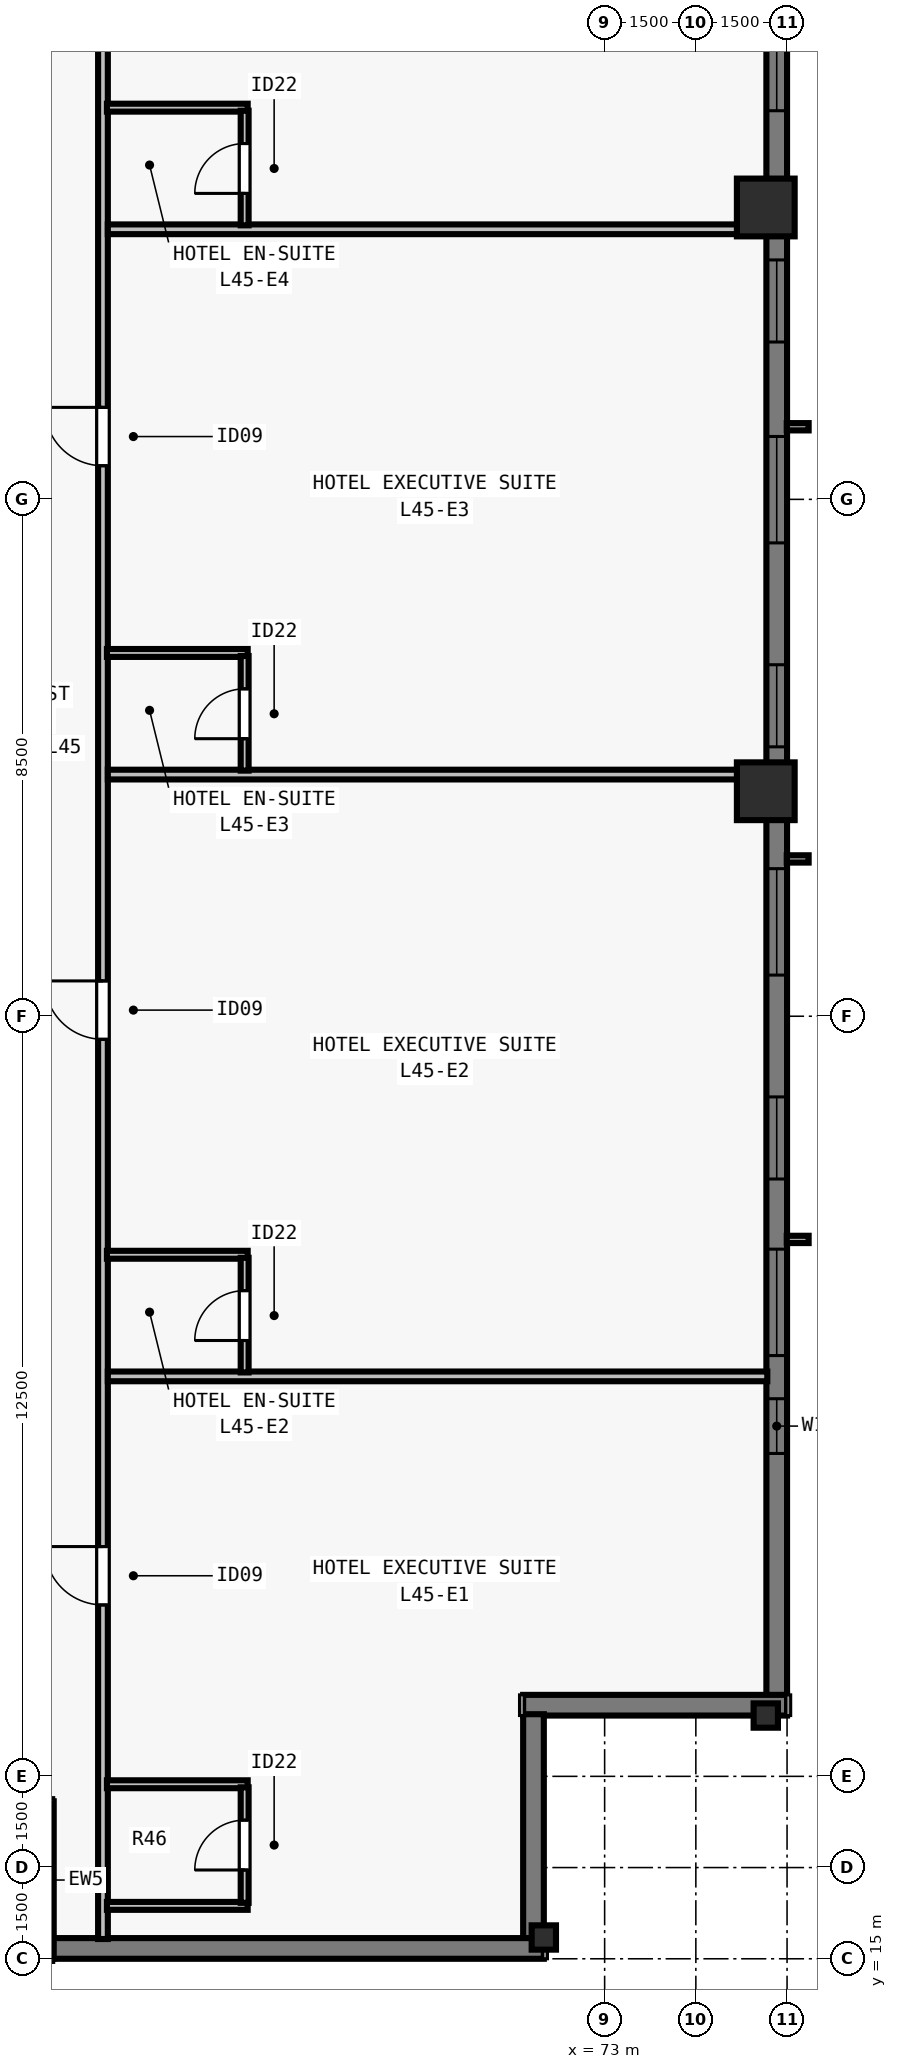
"""IFC4 building model, lengths in metres.
Left out: names, types, materials, properties, quantities, classifications, styles, units other than length and angle.
Written with IfcOpenShell. Run it as: python <this file> out.ifc"""

import sys

from ifc_helpers import new_model, si_unit, direction, frame, frame_2d, origin, origin_2d, place, context, subcontext, project, spatial, rectangle, i_section, extrude, element, fill, save


model = new_model("IFC4")
c1 = context("Model", 3, precision=1e-05, world=origin(), true_north=direction((0.0, 1.0)))
c2 = subcontext(c1, "Body", "Model", "MODEL_VIEW")
j1 = project(units=[si_unit("LENGTHUNIT", "METRE"), si_unit("PLANEANGLEUNIT", "RADIAN")], contexts=[c1])
p1 = place(None, origin())
s1 = spatial("IfcSite", under=j1, at=p1, CompositionType="ELEMENT")
p2 = place(p1, origin())
s2 = spatial("IfcBuilding", under=s1, at=p2, CompositionType="ELEMENT")
p3 = place(p2, frame((0.0, 0.0, 165.5)))
s3 = spatial("IfcBuildingStorey", under=s2, at=p3, CompositionType="ELEMENT", Elevation=165.5)
for number, where, z_axis, x_axis in (
    (1, (72.0, 15.35, 0.0), (0.0, 0.0, 1.0), (1.0, 0.0, 0.0)),
    (2, (75.65, 19.0, 0.0), (0.0, 0.0, 1.0), (0.0, 1.0, 0.0)),
):
    element("IfcColumn", number, at=place(p3, frame(where, z_axis=z_axis, x_axis=x_axis)), inside=s3, PredefinedType="COLUMN", context=c2, shape_type="SweptSolid", body=[
        extrude(i_section(OverallWidth=0.4, OverallDepth=0.4, WebThickness=0.022, FlangeThickness=0.036, at=origin_2d()), origin(), (0.0, 0.0, 1.0), 3.5),
    ])
for number, where, z_axis, x_axis in (
    (3, (75.65, 34.2, 0.0), (0.0, 0.0, 1.0), (0.0, 1.0, 0.0)),
    (4, (75.65, 43.8, 0.0), (0.0, 0.0, 1.0), (0.0, 1.0, 0.0)),
):
    element("IfcColumn", number, at=place(p3, frame(where, z_axis=z_axis, x_axis=x_axis)), inside=s3, PredefinedType="COLUMN", context=c2, shape_type="SweptSolid", body=[
        extrude(rectangle(XDim=0.95, YDim=0.95, at=origin_2d()), origin(), (0.0, 0.0, 1.0), 3.5),
    ])
p4 = place(p3, frame((75.83, 59.0, 0.0), z_axis=(0.0, 0.0, 1.0), x_axis=(0.0, -1.0, 0.0)))
e5 = element("IfcWall", 5, at=p4, inside=s3, PredefinedType="SOLIDWALL", context=c2, shape_type="SweptSolid", body=[
    extrude(rectangle(XDim=39.682, YDim=0.34, at=frame_2d((19.841, 0.0))), origin(), (0.0, 0.0, 1.0), 3.28),
])
p5 = place(p4, frame((6.002, 0.0, 0.8)))
e6 = element("IfcOpeningElement", 6, at=p5, cuts=e5, PredefinedType="OPENING", context=c2, shape_type="SweptSolid", body=[
    extrude(rectangle(XDim=1.75, YDim=1.66, at=frame_2d((0.875, 0.83))), frame((0.0, 0.18, 0.0), z_axis=(0.0, -1.0, 0.0), x_axis=(1.0, 0.0, 0.0)), (0.0, 0.0, 1.0), 0.36),
])
p6 = place(p4, frame((8.505, 0.0, 0.8)))
e7 = element("IfcOpeningElement", 7, at=p6, cuts=e5, PredefinedType="OPENING", context=c2, shape_type="SweptSolid", body=[
    extrude(rectangle(XDim=1.35, YDim=1.66, at=frame_2d((0.675, 0.83))), frame((0.0, 0.18, 0.0), z_axis=(0.0, -1.0, 0.0), x_axis=(1.0, 0.0, 0.0)), (0.0, 0.0, 1.0), 0.36),
])
p7 = place(p4, frame((11.859, 0.0, 0.8)))
e8 = element("IfcOpeningElement", 8, at=p7, cuts=e5, PredefinedType="OPENING", context=c2, shape_type="SweptSolid", body=[
    extrude(rectangle(XDim=1.75, YDim=1.66, at=frame_2d((0.875, 0.83))), frame((0.0, 0.18, 0.0), z_axis=(0.0, -1.0, 0.0), x_axis=(1.0, 0.0, 0.0)), (0.0, 0.0, 1.0), 0.36),
])
p8 = place(p4, frame((16.062, 0.0, 0.8)))
e9 = element("IfcOpeningElement", 9, at=p8, cuts=e5, PredefinedType="OPENING", context=c2, shape_type="SweptSolid", body=[
    extrude(rectangle(XDim=1.35, YDim=1.66, at=frame_2d((0.675, 0.83))), frame((0.0, 0.18, 0.0), z_axis=(0.0, -1.0, 0.0), x_axis=(1.0, 0.0, 0.0)), (0.0, 0.0, 1.0), 0.36),
])
p9 = place(p4, frame((18.966, 0.0, 0.8)))
e10 = element("IfcOpeningElement", 10, at=p9, cuts=e5, PredefinedType="OPENING", context=c2, shape_type="SweptSolid", body=[
    extrude(rectangle(XDim=1.75, YDim=1.66, at=frame_2d((0.875, 0.83))), frame((0.0, 0.18, 0.0), z_axis=(0.0, -1.0, 0.0), x_axis=(1.0, 0.0, 0.0)), (0.0, 0.0, 1.0), 0.36),
])
p10 = place(p4, frame((22.719, 0.0, 0.8)))
e11 = element("IfcOpeningElement", 11, at=p10, cuts=e5, PredefinedType="OPENING", context=c2, shape_type="SweptSolid", body=[
    extrude(rectangle(XDim=1.35, YDim=1.66, at=frame_2d((0.675, 0.83))), frame((0.0, 0.18, 0.0), z_axis=(0.0, -1.0, 0.0), x_axis=(1.0, 0.0, 0.0)), (0.0, 0.0, 1.0), 0.36),
])
p11 = place(p4, frame((26.073, 0.0, 0.8)))
e12 = element("IfcOpeningElement", 12, at=p11, cuts=e5, PredefinedType="OPENING", context=c2, shape_type="SweptSolid", body=[
    extrude(rectangle(XDim=1.75, YDim=1.66, at=frame_2d((0.875, 0.83))), frame((0.0, 0.18, 0.0), z_axis=(0.0, -1.0, 0.0), x_axis=(1.0, 0.0, 0.0)), (0.0, 0.0, 1.0), 0.36),
])
p12 = place(p4, frame((29.827, 0.0, 0.8)))
e13 = element("IfcOpeningElement", 13, at=p12, cuts=e5, PredefinedType="OPENING", context=c2, shape_type="SweptSolid", body=[
    extrude(rectangle(XDim=1.35, YDim=1.66, at=frame_2d((0.675, 0.83))), frame((0.0, 0.18, 0.0), z_axis=(0.0, -1.0, 0.0), x_axis=(1.0, 0.0, 0.0)), (0.0, 0.0, 1.0), 0.36),
])
p13 = place(p4, frame((32.33, 0.0, 0.8)))
e14 = element("IfcOpeningElement", 14, at=p13, cuts=e5, PredefinedType="OPENING", context=c2, shape_type="SweptSolid", body=[
    extrude(rectangle(XDim=1.75, YDim=1.66, at=frame_2d((0.875, 0.83))), frame((0.0, 0.18, 0.0), z_axis=(0.0, -1.0, 0.0), x_axis=(1.0, 0.0, 0.0)), (0.0, 0.0, 1.0), 0.36),
])
p14 = place(p4, frame((34.79, 0.0, 0.8)))
e15 = element("IfcOpeningElement", 15, at=p14, cuts=e5, PredefinedType="OPENING", context=c2, shape_type="SweptSolid", body=[
    extrude(rectangle(XDim=0.9, YDim=1.66, at=frame_2d((0.45, 0.83))), frame((0.0, 0.18, 0.0), z_axis=(0.0, -1.0, 0.0), x_axis=(1.0, 0.0, 0.0)), (0.0, 0.0, 1.0), 0.36),
])
p15 = place(p3, frame((76.0, 19.17, 0.0), z_axis=(0.0, 0.0, 1.0), x_axis=(-1.0, 0.0, 0.0)))
e16 = element("IfcWall", 16, at=p15, inside=s3, PredefinedType="SOLIDWALL", context=c2, shape_type="SweptSolid", body=[
    extrude(rectangle(XDim=4.34, YDim=0.34, at=frame_2d((2.17, 0.0))), origin(), (0.0, 0.0, 1.0), 3.28),
])
p16 = place(p3, frame((71.83, 19.022, 0.0), z_axis=(0.0, 0.0, 1.0), x_axis=(0.0, -1.0, 0.0)))
e17 = element("IfcWall", 17, at=p16, inside=s3, PredefinedType="SOLIDWALL", context=c2, shape_type="SweptSolid", body=[
    extrude(rectangle(XDim=3.704, YDim=0.34, at=frame_2d((1.852, 0.0))), origin(), (0.0, 0.0, 1.0), 3.28),
])
p17 = place(p3, frame((72.0, 15.17, 0.0), z_axis=(0.0, 0.0, 1.0), x_axis=(-1.0, 0.0, 0.0)))
e18 = element("IfcWall", 18, at=p17, inside=s3, PredefinedType="SOLIDWALL", context=c2, shape_type="SweptSolid", body=[
    extrude(rectangle(XDim=8.082, YDim=0.34, at=frame_2d((4.041, 0.0))), origin(), (0.0, 0.0, 1.0), 3.28),
])
p18 = place(p3, frame((63.77, 15.0, 0.0), z_axis=(0.0, 0.0, 1.0), x_axis=(0.0, 1.0, 0.0)))
e19 = element("IfcWall", 19, at=p18, inside=s3, PredefinedType="SOLIDWALL", context=c2, shape_type="SweptSolid", body=[
    extrude(rectangle(XDim=2.59, YDim=0.34, at=frame_2d((1.295, 0.0))), origin(), (0.0, 0.0, 1.0), 3.28),
])
p19 = place(p3, frame((64.75, 15.325, 0.0), z_axis=(0.0, 0.0, 1.0), x_axis=(0.0, 1.0, 0.0)))
e20 = element("IfcWall", 20, at=p19, inside=s3, PredefinedType="PARTITIONING", context=c2, shape_type="SweptSolid", body=[
    extrude(rectangle(XDim=47.35, YDim=0.16, at=frame_2d((23.675, 0.0))), origin(), (0.0, 0.0, 1.0), 2.555),
])
p20 = place(p19, frame((5.494, 0.0, 0.0)))
e21 = element("IfcOpeningElement", 21, at=p20, cuts=e20, PredefinedType="OPENING", context=c2, shape_type="SweptSolid", body=[
    extrude(rectangle(XDim=0.96, YDim=2.15, at=frame_2d((0.48, 1.075))), frame((0.0, 0.09, 0.0), z_axis=(0.0, -1.0, 0.0), x_axis=(1.0, 0.0, 0.0)), (0.0, 0.0, 1.0), 0.18),
])
p21 = place(p19, frame((14.796, 0.0, 0.0)))
e22 = element("IfcOpeningElement", 22, at=p21, cuts=e20, PredefinedType="OPENING", context=c2, shape_type="SweptSolid", body=[
    extrude(rectangle(XDim=0.96, YDim=2.15, at=frame_2d((0.48, 1.075))), frame((0.0, 0.09, 0.0), z_axis=(0.0, -1.0, 0.0), x_axis=(1.0, 0.0, 0.0)), (0.0, 0.0, 1.0), 0.18),
])
p22 = place(p19, frame((24.228, 0.0, 0.0)))
e23 = element("IfcOpeningElement", 23, at=p22, cuts=e20, PredefinedType="OPENING", context=c2, shape_type="SweptSolid", body=[
    extrude(rectangle(XDim=0.96, YDim=2.15, at=frame_2d((0.48, 1.075))), frame((0.0, 0.09, 0.0), z_axis=(0.0, -1.0, 0.0), x_axis=(1.0, 0.0, 0.0)), (0.0, 0.0, 1.0), 0.18),
])
p23 = place(p19, frame((33.66, 0.0, 0.0)))
e24 = element("IfcOpeningElement", 24, at=p23, cuts=e20, PredefinedType="OPENING", context=c2, shape_type="SweptSolid", body=[
    extrude(rectangle(XDim=0.96, YDim=2.15, at=frame_2d((0.48, 1.075))), frame((0.0, 0.09, 0.0), z_axis=(0.0, -1.0, 0.0), x_axis=(1.0, 0.0, 0.0)), (0.0, 0.0, 1.0), 0.18),
])
p24 = place(p19, frame((43.229, 0.0, 0.0)))
e25 = element("IfcOpeningElement", 25, at=p24, cuts=e20, PredefinedType="OPENING", context=c2, shape_type="SweptSolid", body=[
    extrude(rectangle(XDim=0.96, YDim=2.15, at=frame_2d((0.48, 1.075))), frame((0.0, 0.09, 0.0), z_axis=(0.0, -1.0, 0.0), x_axis=(1.0, 0.0, 0.0)), (0.0, 0.0, 1.0), 0.18),
])
for number, where, z_axis, x_axis in (
    (26, (64.815, 15.87, 0.0), (0.0, 0.0, 1.0), (1.0, 0.0, 0.0)),
    (27, (64.815, 17.87, 0.0), (0.0, 0.0, 1.0), (1.0, 0.0, 0.0)),
):
    element("IfcWall", number, at=place(p3, frame(where, z_axis=z_axis, x_axis=x_axis)), inside=s3, PredefinedType="PLUMBINGWALL", context=c2, shape_type="SweptSolid", body=[
        extrude(rectangle(XDim=2.315, YDim=0.13, at=frame_2d((1.157, 0.0))), origin(), (0.0, 0.0, 1.0), 3.28),
    ])
p25 = place(p3, frame((67.08, 15.92, 0.0), z_axis=(0.0, 0.0, 1.0), x_axis=(0.0, 1.0, 0.0)))
e28 = element("IfcWall", 28, at=p25, inside=s3, PredefinedType="PLUMBINGWALL", context=c2, shape_type="SweptSolid", body=[
    extrude(rectangle(XDim=1.9, YDim=0.13, at=frame_2d((0.95, 0.0))), origin(), (0.0, 0.0, 1.0), 3.28),
])
p26 = place(p25, frame((0.54, 0.0, 0.0)))
e29 = element("IfcOpeningElement", 29, at=p26, cuts=e28, PredefinedType="OPENING", context=c2, shape_type="SweptSolid", body=[
    extrude(rectangle(XDim=0.82, YDim=2.1, at=frame_2d((0.41, 1.05))), frame((0.0, 0.075, 0.0), z_axis=(0.0, -1.0, 0.0), x_axis=(1.0, 0.0, 0.0)), (0.0, 0.0, 1.0), 0.15),
])
p27 = place(p3, frame((64.83, 24.577, 0.0), z_axis=(0.0, 0.0, 1.0), x_axis=(1.0, 0.0, 0.0)))
e30 = element("IfcWall", 30, at=p27, inside=s3, PredefinedType="PARTITIONING", context=c2, shape_type="SweptSolid", body=[
    extrude(rectangle(XDim=10.845, YDim=0.16, at=frame_2d((5.422, 0.0))), origin(), (0.0, 0.0, 1.0), 2.896),
])
p28 = place(p3, frame((64.815, 26.577, 0.0), z_axis=(0.0, 0.0, 1.0), x_axis=(1.0, 0.0, 0.0)))
e31 = element("IfcWall", 31, at=p28, inside=s3, PredefinedType="PLUMBINGWALL", context=c2, shape_type="SweptSolid", body=[
    extrude(rectangle(XDim=2.315, YDim=0.13, at=frame_2d((1.157, 0.0))), origin(), (0.0, 0.0, 1.0), 2.896),
])
p29 = place(p3, frame((67.08, 24.642, 0.0), z_axis=(0.0, 0.0, 1.0), x_axis=(0.0, 1.0, 0.0)))
e32 = element("IfcWall", 32, at=p29, inside=s3, PredefinedType="PLUMBINGWALL", context=c2, shape_type="SweptSolid", body=[
    extrude(rectangle(XDim=1.885, YDim=0.13, at=frame_2d((0.942, 0.0))), origin(), (0.0, 0.0, 1.0), 3.28),
])
p30 = place(p29, frame((0.525, 0.0, 0.0)))
e33 = element("IfcOpeningElement", 33, at=p30, cuts=e32, PredefinedType="OPENING", context=c2, shape_type="SweptSolid", body=[
    extrude(rectangle(XDim=0.82, YDim=2.1, at=frame_2d((0.41, 1.05))), frame((0.0, 0.075, 0.0), z_axis=(0.0, -1.0, 0.0), x_axis=(1.0, 0.0, 0.0)), (0.0, 0.0, 1.0), 0.15),
])
p31 = place(p3, frame((64.83, 34.474, 0.0), z_axis=(0.0, 0.0, 1.0), x_axis=(1.0, 0.0, 0.0)))
e34 = element("IfcWall", 34, at=p31, inside=s3, PredefinedType="PARTITIONING", context=c2, shape_type="SweptSolid", body=[
    extrude(rectangle(XDim=10.845, YDim=0.16, at=frame_2d((5.422, 0.0))), origin(), (0.0, 0.0, 1.0), 3.28),
])
p32 = place(p3, frame((64.815, 36.474, 0.0), z_axis=(0.0, 0.0, 1.0), x_axis=(1.0, 0.0, 0.0)))
e35 = element("IfcWall", 35, at=p32, inside=s3, PredefinedType="PLUMBINGWALL", context=c2, shape_type="SweptSolid", body=[
    extrude(rectangle(XDim=2.315, YDim=0.13, at=frame_2d((1.157, 0.0))), origin(), (0.0, 0.0, 1.0), 3.28),
])
p33 = place(p3, frame((67.08, 34.539, 0.0), z_axis=(0.0, 0.0, 1.0), x_axis=(0.0, 1.0, 0.0)))
e36 = element("IfcWall", 36, at=p33, inside=s3, PredefinedType="PLUMBINGWALL", context=c2, shape_type="SweptSolid", body=[
    extrude(rectangle(XDim=1.885, YDim=0.13, at=frame_2d((0.942, 0.0))), origin(), (0.0, 0.0, 1.0), 3.28),
])
p34 = place(p33, frame((0.525, 0.0, 0.0)))
e37 = element("IfcOpeningElement", 37, at=p34, cuts=e36, PredefinedType="OPENING", context=c2, shape_type="SweptSolid", body=[
    extrude(rectangle(XDim=0.82, YDim=2.1, at=frame_2d((0.41, 1.05))), frame((0.0, 0.075, 0.0), z_axis=(0.0, -1.0, 0.0), x_axis=(1.0, 0.0, 0.0)), (0.0, 0.0, 1.0), 0.15),
])
p35 = place(p3, frame((64.83, 43.441, 0.0), z_axis=(0.0, 0.0, 1.0), x_axis=(1.0, 0.0, 0.0)))
e38 = element("IfcWall", 38, at=p35, inside=s3, PredefinedType="PARTITIONING", context=c2, shape_type="SweptSolid", body=[
    extrude(rectangle(XDim=10.845, YDim=0.16, at=frame_2d((5.422, 0.0))), origin(), (0.0, 0.0, 1.0), 3.28),
])
p36 = place(p3, frame((64.815, 45.441, 0.0), z_axis=(0.0, 0.0, 1.0), x_axis=(1.0, 0.0, 0.0)))
e39 = element("IfcWall", 39, at=p36, inside=s3, PredefinedType="PLUMBINGWALL", context=c2, shape_type="SweptSolid", body=[
    extrude(rectangle(XDim=2.315, YDim=0.13, at=frame_2d((1.157, 0.0))), origin(), (0.0, 0.0, 1.0), 3.28),
])
p37 = place(p3, frame((67.08, 43.506, 0.0), z_axis=(0.0, 0.0, 1.0), x_axis=(0.0, 1.0, 0.0)))
e40 = element("IfcWall", 40, at=p37, inside=s3, PredefinedType="PLUMBINGWALL", context=c2, shape_type="SweptSolid", body=[
    extrude(rectangle(XDim=1.885, YDim=0.13, at=frame_2d((0.942, 0.0))), origin(), (0.0, 0.0, 1.0), 3.28),
])
p38 = place(p37, frame((0.525, 0.0, 0.0)))
e41 = element("IfcOpeningElement", 41, at=p38, cuts=e40, PredefinedType="OPENING", context=c2, shape_type="SweptSolid", body=[
    extrude(rectangle(XDim=0.82, YDim=2.1, at=frame_2d((0.41, 1.05))), frame((0.0, 0.075, 0.0), z_axis=(0.0, -1.0, 0.0), x_axis=(1.0, 0.0, 0.0)), (0.0, 0.0, 1.0), 0.15),
])
p39 = place(p7, origin())
e42 = element("IfcWindow", 42, at=p39, inside=s3, PartitioningType="SINGLE_PANEL", PredefinedType="WINDOW", context=c2, shape_type="SweptSolid", body=[
    extrude(rectangle(XDim=1.75, YDim=1.66, at=frame_2d((0.875, 0.83))), frame((0.0, -0.05, 0.0), z_axis=(0.0, -1.0, 0.0), x_axis=(1.0, 0.0, 0.0)), (0.0, 0.0, 1.0), 0.06),
])
fill(e8, e42)
p40 = place(p8, origin())
e43 = element("IfcWindow", 43, at=p40, inside=s3, PartitioningType="SINGLE_PANEL", PredefinedType="WINDOW", context=c2, shape_type="SweptSolid", body=[
    extrude(rectangle(XDim=1.35, YDim=1.66, at=frame_2d((0.675, 0.83))), frame((0.0, -0.05, 0.0), z_axis=(0.0, -1.0, 0.0), x_axis=(1.0, 0.0, 0.0)), (0.0, 0.0, 1.0), 0.06),
])
fill(e9, e43)
p41 = place(p9, origin())
e44 = element("IfcWindow", 44, at=p41, inside=s3, PartitioningType="SINGLE_PANEL", PredefinedType="WINDOW", context=c2, shape_type="SweptSolid", body=[
    extrude(rectangle(XDim=1.75, YDim=1.66, at=frame_2d((0.875, 0.83))), frame((0.0, -0.05, 0.0), z_axis=(0.0, -1.0, 0.0), x_axis=(1.0, 0.0, 0.0)), (0.0, 0.0, 1.0), 0.06),
])
fill(e10, e44)
p42 = place(p10, origin())
e45 = element("IfcWindow", 45, at=p42, inside=s3, PartitioningType="SINGLE_PANEL", PredefinedType="WINDOW", context=c2, shape_type="SweptSolid", body=[
    extrude(rectangle(XDim=1.35, YDim=1.66, at=frame_2d((0.675, 0.83))), frame((0.0, -0.05, 0.0), z_axis=(0.0, -1.0, 0.0), x_axis=(1.0, 0.0, 0.0)), (0.0, 0.0, 1.0), 0.06),
])
fill(e11, e45)
p43 = place(p11, origin())
e46 = element("IfcWindow", 46, at=p43, inside=s3, PartitioningType="SINGLE_PANEL", PredefinedType="WINDOW", context=c2, shape_type="SweptSolid", body=[
    extrude(rectangle(XDim=1.75, YDim=1.66, at=frame_2d((0.875, 0.83))), frame((0.0, -0.05, 0.0), z_axis=(0.0, -1.0, 0.0), x_axis=(1.0, 0.0, 0.0)), (0.0, 0.0, 1.0), 0.06),
])
fill(e12, e46)
p44 = place(p12, origin())
e47 = element("IfcWindow", 47, at=p44, inside=s3, PartitioningType="SINGLE_PANEL", PredefinedType="WINDOW", context=c2, shape_type="SweptSolid", body=[
    extrude(rectangle(XDim=1.35, YDim=1.66, at=frame_2d((0.675, 0.83))), frame((0.0, -0.05, 0.0), z_axis=(0.0, -1.0, 0.0), x_axis=(1.0, 0.0, 0.0)), (0.0, 0.0, 1.0), 0.06),
])
fill(e13, e47)
p45 = place(p13, origin())
e48 = element("IfcWindow", 48, at=p45, inside=s3, PartitioningType="SINGLE_PANEL", PredefinedType="WINDOW", context=c2, shape_type="SweptSolid", body=[
    extrude(rectangle(XDim=1.75, YDim=1.66, at=frame_2d((0.875, 0.83))), frame((0.0, -0.05, 0.0), z_axis=(0.0, -1.0, 0.0), x_axis=(1.0, 0.0, 0.0)), (0.0, 0.0, 1.0), 0.06),
])
fill(e14, e48)
p46 = place(p14, origin())
e49 = element("IfcWindow", 49, at=p46, inside=s3, PartitioningType="SINGLE_PANEL", PredefinedType="WINDOW", context=c2, shape_type="SweptSolid", body=[
    extrude(rectangle(XDim=0.9, YDim=1.66, at=frame_2d((0.45, 0.83))), frame((0.0, -0.04, 0.0), z_axis=(0.0, -1.0, 0.0), x_axis=(1.0, 0.0, 0.0)), (0.0, 0.0, 1.0), 0.06),
])
fill(e15, e49)
p47 = place(p26, origin())
e50 = element("IfcDoor", 50, at=p47, inside=s3, OperationType="SINGLE_SWING_LEFT", PredefinedType="DOOR", context=c2, shape_type="SweptSolid", body=[
    extrude(rectangle(XDim=0.82, YDim=2.1, at=frame_2d((0.41, 1.05))), frame((0.0, 0.025, 0.0), z_axis=(0.0, -1.0, 0.0), x_axis=(1.0, 0.0, 0.0)), (0.0, 0.0, 1.0), 0.05),
])
fill(e29, e50)
p48 = place(p20, origin())
e51 = element("IfcDoor", 51, at=p48, inside=s3, OperationType="SINGLE_SWING_RIGHT", PredefinedType="DOOR", context=c2, shape_type="SweptSolid", body=[
    extrude(rectangle(XDim=0.96, YDim=2.15, at=frame_2d((0.48, 1.075))), frame((0.0, 0.025, 0.0), z_axis=(0.0, -1.0, 0.0), x_axis=(1.0, 0.0, 0.0)), (0.0, 0.0, 1.0), 0.05),
])
fill(e21, e51)
p49 = place(p30, origin())
e52 = element("IfcDoor", 52, at=p49, inside=s3, OperationType="SINGLE_SWING_LEFT", PredefinedType="DOOR", context=c2, shape_type="SweptSolid", body=[
    extrude(rectangle(XDim=0.82, YDim=2.1, at=frame_2d((0.41, 1.05))), frame((0.0, 0.025, 0.0), z_axis=(0.0, -1.0, 0.0), x_axis=(1.0, 0.0, 0.0)), (0.0, 0.0, 1.0), 0.05),
])
fill(e33, e52)
p50 = place(p21, origin())
e53 = element("IfcDoor", 53, at=p50, inside=s3, OperationType="SINGLE_SWING_RIGHT", PredefinedType="DOOR", context=c2, shape_type="SweptSolid", body=[
    extrude(rectangle(XDim=0.96, YDim=2.15, at=frame_2d((0.48, 1.075))), frame((0.0, 0.025, 0.0), z_axis=(0.0, -1.0, 0.0), x_axis=(1.0, 0.0, 0.0)), (0.0, 0.0, 1.0), 0.05),
])
fill(e22, e53)
p51 = place(p34, origin())
e54 = element("IfcDoor", 54, at=p51, inside=s3, OperationType="SINGLE_SWING_LEFT", PredefinedType="DOOR", context=c2, shape_type="SweptSolid", body=[
    extrude(rectangle(XDim=0.82, YDim=2.1, at=frame_2d((0.41, 1.05))), frame((0.0, 0.025, 0.0), z_axis=(0.0, -1.0, 0.0), x_axis=(1.0, 0.0, 0.0)), (0.0, 0.0, 1.0), 0.05),
])
fill(e37, e54)
p52 = place(p22, origin())
e55 = element("IfcDoor", 55, at=p52, inside=s3, OperationType="SINGLE_SWING_RIGHT", PredefinedType="DOOR", context=c2, shape_type="SweptSolid", body=[
    extrude(rectangle(XDim=0.96, YDim=2.15, at=frame_2d((0.48, 1.075))), frame((0.0, 0.025, 0.0), z_axis=(0.0, -1.0, 0.0), x_axis=(1.0, 0.0, 0.0)), (0.0, 0.0, 1.0), 0.05),
])
fill(e23, e55)
p53 = place(p38, origin())
e56 = element("IfcDoor", 56, at=p53, inside=s3, OperationType="SINGLE_SWING_LEFT", PredefinedType="DOOR", context=c2, shape_type="SweptSolid", body=[
    extrude(rectangle(XDim=0.82, YDim=2.1, at=frame_2d((0.41, 1.05))), frame((0.0, 0.025, 0.0), z_axis=(0.0, -1.0, 0.0), x_axis=(1.0, 0.0, 0.0)), (0.0, 0.0, 1.0), 0.05),
])
fill(e41, e56)
save(model, sys.argv[1])
